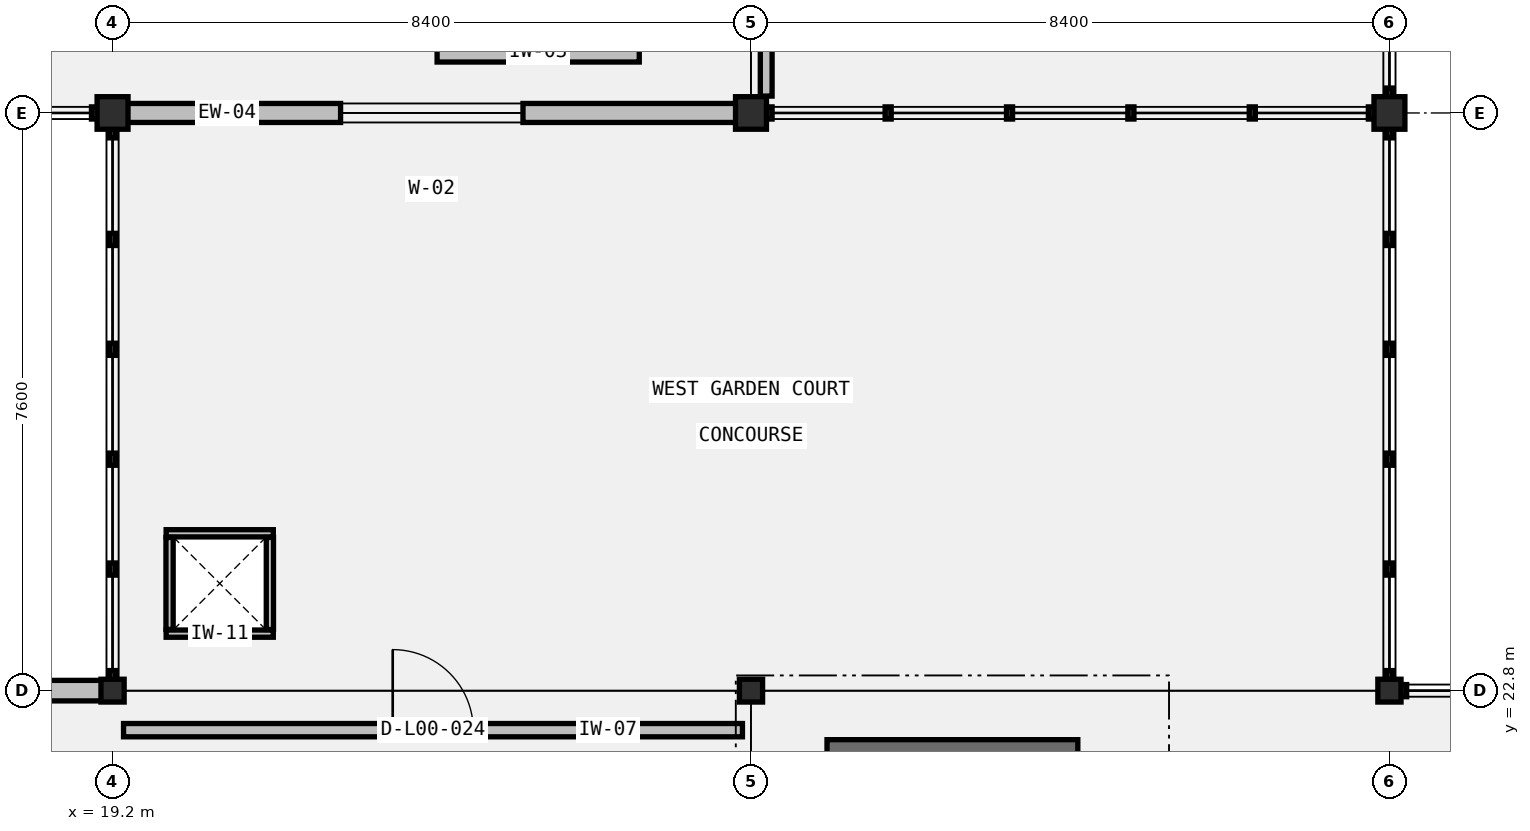
"""IFC4 building model, lengths in metres.
Left out: names, types, materials, properties, quantities, classifications, styles, units other than length and angle.
Written with IfcOpenShell. Run it as: python <this file> out.ifc"""

import sys

from ifc_helpers import new_model, si_unit, direction, frame, frame_2d, origin, origin_2d, place, context, subcontext, project, spatial, rectangle, i_section, extrude, element, fill, save


model = new_model("IFC4")
c1 = context("Model", 3, precision=1e-05, world=origin(), true_north=direction((0.0, 1.0)))
c2 = subcontext(c1, "Body", "Model", "MODEL_VIEW")
j1 = project(units=[si_unit("LENGTHUNIT", "METRE"), si_unit("PLANEANGLEUNIT", "RADIAN")], contexts=[c1])
p1 = place(None, origin())
s1 = spatial("IfcSite", under=j1, at=p1, CompositionType="ELEMENT")
p2 = place(p1, origin())
s2 = spatial("IfcBuilding", under=s1, at=p2, CompositionType="ELEMENT")
p3 = place(p2, origin())
s3 = spatial("IfcBuildingStorey", under=s2, at=p3, CompositionType="ELEMENT", Elevation=0.0)
p4 = place(p3, frame((19.2, 22.8, 0.0), z_axis=(0.0, 0.0, 1.0), x_axis=(1.0, 0.0, 0.0)))
e1 = element("IfcColumn", 1, at=p4, inside=s3, PredefinedType="COLUMN", context=c2, shape_type="SweptSolid", body=[
    extrude(i_section(OverallWidth=0.305, OverallDepth=0.3, WebThickness=0.015, FlangeThickness=0.015, FilletRadius=0.018, at=origin_2d()), origin(), (0.0, 0.0, 1.0), 5.4),
])
p5 = place(p3, frame((19.2, 30.4, -0.3), z_axis=(0.0, 0.0, 1.0), x_axis=(1.0, 0.0, 0.0)))
e2 = element("IfcColumn", 2, at=p5, inside=s3, PredefinedType="COLUMN", context=c2, shape_type="SweptSolid", body=[
    extrude(i_section(OverallWidth=0.407, OverallDepth=0.428, WebThickness=0.02, FlangeThickness=0.035, FilletRadius=0.022, at=origin_2d()), origin(), (0.0, 0.0, 1.0), 5.7),
])
p6 = place(p3, frame((27.6, 22.8, 0.0), z_axis=(0.0, 0.0, 1.0), x_axis=(1.0, 0.0, 0.0)))
e3 = element("IfcColumn", 3, at=p6, inside=s3, PredefinedType="COLUMN", context=c2, shape_type="SweptSolid", body=[
    extrude(i_section(OverallWidth=0.305, OverallDepth=0.3, WebThickness=0.015, FlangeThickness=0.015, FilletRadius=0.018, at=origin_2d()), origin(), (0.0, 0.0, 1.0), 5.4),
])
p7 = place(p3, frame((27.6, 30.4, -0.3), z_axis=(0.0, 0.0, 1.0), x_axis=(1.0, 0.0, 0.0)))
e4 = element("IfcColumn", 4, at=p7, inside=s3, PredefinedType="COLUMN", context=c2, shape_type="SweptSolid", body=[
    extrude(i_section(OverallWidth=0.407, OverallDepth=0.428, WebThickness=0.02, FlangeThickness=0.035, FilletRadius=0.022, at=origin_2d()), origin(), (0.0, 0.0, 1.0), 5.7),
])
p8 = place(p3, frame((36.0, 22.8, 0.0), z_axis=(0.0, 0.0, 1.0), x_axis=(1.0, 0.0, 0.0)))
e5 = element("IfcColumn", 5, at=p8, inside=s3, PredefinedType="COLUMN", context=c2, shape_type="SweptSolid", body=[
    extrude(i_section(OverallWidth=0.305, OverallDepth=0.3, WebThickness=0.015, FlangeThickness=0.015, FilletRadius=0.018, at=origin_2d()), origin(), (0.0, 0.0, 1.0), 5.4),
])
p9 = place(p3, frame((36.0, 30.4, -0.3), z_axis=(0.0, 0.0, 1.0), x_axis=(1.0, 0.0, 0.0)))
e6 = element("IfcColumn", 6, at=p9, inside=s3, PredefinedType="COLUMN", context=c2, shape_type="SweptSolid", body=[
    extrude(i_section(OverallWidth=0.407, OverallDepth=0.428, WebThickness=0.02, FlangeThickness=0.035, FilletRadius=0.022, at=origin_2d()), origin(), (0.0, 0.0, 1.0), 5.7),
])
p10 = place(p3, frame((31.9, 21.98, 0.0), z_axis=(0.0, 0.0, 1.0), x_axis=(-1.0, 0.0, 0.0)))
e7 = element("IfcWall", 7, at=p10, inside=s3, PredefinedType="SHEAR", context=c2, shape_type="SweptSolid", body=[
    extrude(rectangle(XDim=3.3, YDim=0.35, at=frame_2d((1.65, 0.0))), origin(), (0.0, 0.0, 1.0), 5.16),
])
p11 = place(p3, frame((19.213, 30.4, 0.0), z_axis=(0.0, 0.0, 1.0), x_axis=(1.0, 0.0, 0.0)))
e8 = element("IfcWall", 8, at=p11, inside=s3, PredefinedType="STANDARD", context=c2, shape_type="SweptSolid", body=[
    extrude(rectangle(XDim=8.374, YDim=0.25, at=frame_2d((4.187, 0.0))), origin(), (0.0, 0.0, 1.0), 4.138),
])
p12 = place(p11, frame((2.987, 0.0, 0.85)))
e9 = element("IfcOpeningElement", 9, at=p12, cuts=e8, PredefinedType="OPENING", context=c2, shape_type="SweptSolid", body=[
    extrude(rectangle(XDim=2.4, YDim=2.4, at=frame_2d((1.2, 1.2))), frame((0.0, 0.135, 0.0), z_axis=(0.0, -1.0, 0.0), x_axis=(1.0, 0.0, 0.0)), (0.0, 0.0, 1.0), 0.27),
])
p13 = place(p3, frame((12.811, 22.8, 0.0), z_axis=(0.0, 0.0, 1.0), x_axis=(1.0, 0.0, 0.0)))
e10 = element("IfcWall", 10, at=p13, inside=s3, PredefinedType="STANDARD", context=c2, shape_type="SweptSolid", body=[
    extrude(rectangle(XDim=6.379, YDim=0.27, at=frame_2d((3.189, 0.0))), origin(), (0.0, 0.0, 1.0), 4.556),
])
p14 = place(p13, frame((2.389, 0.0, 0.95)))
e11 = element("IfcOpeningElement", 11, at=p14, cuts=e10, PredefinedType="OPENING", context=c2, shape_type="SweptSolid", body=[
    extrude(rectangle(XDim=1.6, YDim=1.8, at=frame_2d((0.8, 0.9))), frame((0.0, 0.145, 0.0), z_axis=(0.0, -1.0, 0.0), x_axis=(1.0, 0.0, 0.0)), (0.0, 0.0, 1.0), 0.29),
])
for number, where, z_axis, x_axis in (
    (12, (19.905, 23.55, 0.0), (0.0, 0.0, 1.0), (1.0, 0.0, 0.0)),
    (13, (19.905, 24.87, 0.0), (0.0, 0.0, 1.0), (1.0, 0.0, 0.0)),
):
    element("IfcWall", number, at=place(p3, frame(where, z_axis=z_axis, x_axis=x_axis)), inside=s3, PredefinedType="PARTITIONING", context=c2, shape_type="SweptSolid", body=[
        extrude(rectangle(XDim=1.41, YDim=0.095, at=frame_2d((0.705, 0.0))), origin(), (0.0, 0.0, 1.0), 4.588),
    ])
for number, where, z_axis, x_axis in (
    (14, (19.95, 23.605, 0.0), (0.0, 0.0, 1.0), (0.0, 1.0, 0.0)),
    (15, (21.27, 23.605, 0.0), (0.0, 0.0, 1.0), (0.0, 1.0, 0.0)),
):
    element("IfcWall", number, at=place(p3, frame(where, z_axis=z_axis, x_axis=x_axis)), inside=s3, PredefinedType="PARTITIONING", context=c2, shape_type="SweptSolid", body=[
        extrude(rectangle(XDim=1.21, YDim=0.095, at=frame_2d((0.605, 0.0))), origin(), (0.0, 0.0, 1.0), 5.16),
    ])
p15 = place(p3, frame((23.47, 31.2, 0.0), z_axis=(0.0, 0.0, 1.0), x_axis=(1.0, 0.0, 0.0)))
e16 = element("IfcWall", 16, at=p15, inside=s3, PredefinedType="STANDARD", context=c2, shape_type="SweptSolid", body=[
    extrude(rectangle(XDim=2.66, YDim=0.26, at=frame_2d((1.33, 0.0))), origin(), (0.0, 0.0, 1.0), 4.788),
])
p16 = place(p3, frame((27.8, 30.622, 0.0), z_axis=(0.0, 0.0, 1.0), x_axis=(0.0, 1.0, 0.0)))
e17 = element("IfcWall", 17, at=p16, inside=s3, PredefinedType="PARTITIONING", context=c2, shape_type="SweptSolid", body=[
    extrude(rectangle(XDim=7.158, YDim=0.155, at=frame_2d((3.579, 0.0))), origin(), (0.0, 0.0, 1.0), 4.55),
])
p17 = place(p16, frame((3.089, 0.0, 0.0)))
e18 = element("IfcOpeningElement", 18, at=p17, cuts=e17, PredefinedType="OPENING", context=c2, shape_type="SweptSolid", body=[
    extrude(rectangle(XDim=0.98, YDim=2.15, at=frame_2d((0.49, 1.075))), frame((0.0, 0.087, 0.0), z_axis=(0.0, -1.0, 0.0), x_axis=(1.0, 0.0, 0.0)), (0.0, 0.0, 1.0), 0.175),
])
p18 = place(p3, frame((19.344, 22.28, 0.0), z_axis=(0.0, 0.0, 1.0), x_axis=(1.0, 0.0, 0.0)))
e19 = element("IfcWall", 19, at=p18, inside=s3, PredefinedType="PARTITIONING", context=c2, shape_type="SweptSolid", body=[
    extrude(rectangle(XDim=8.143, YDim=0.175, at=frame_2d((4.072, 0.0))), origin(), (0.0, 0.0, 1.0), 4.698),
])
p19 = place(p18, frame((3.542, 0.0, 0.0)))
e20 = element("IfcOpeningElement", 20, at=p19, cuts=e19, PredefinedType="OPENING", context=c2, shape_type="SweptSolid", body=[
    extrude(rectangle(XDim=1.06, YDim=2.15, at=frame_2d((0.53, 1.075))), frame((0.0, 0.097, 0.0), z_axis=(0.0, -1.0, 0.0), x_axis=(1.0, 0.0, 0.0)), (0.0, 0.0, 1.0), 0.195),
])
p20 = place(p12, origin())
e21 = element("IfcWindow", 21, at=p20, inside=s3, PartitioningType="TRIPLE_PANEL_VERTICAL", PredefinedType="WINDOW", context=c2, shape_type="SweptSolid", body=[
    extrude(rectangle(XDim=2.4, YDim=2.4, at=frame_2d((1.2, 1.2))), frame((0.0, 0.03, 0.0), z_axis=(0.0, -1.0, 0.0), x_axis=(1.0, 0.0, 0.0)), (0.0, 0.0, 1.0), 0.06),
])
fill(e9, e21)
p21 = place(p19, origin())
e22 = element("IfcDoor", 22, at=p21, inside=s3, OperationType="SINGLE_SWING_LEFT", PredefinedType="DOOR", context=c2, shape_type="SweptSolid", body=[
    extrude(rectangle(XDim=1.06, YDim=2.15, at=frame_2d((0.53, 1.075))), frame((0.0, 0.025, 0.0), z_axis=(0.0, -1.0, 0.0), x_axis=(1.0, 0.0, 0.0)), (0.0, 0.0, 1.0), 0.05),
])
fill(e20, e22)
save(model, sys.argv[1])
